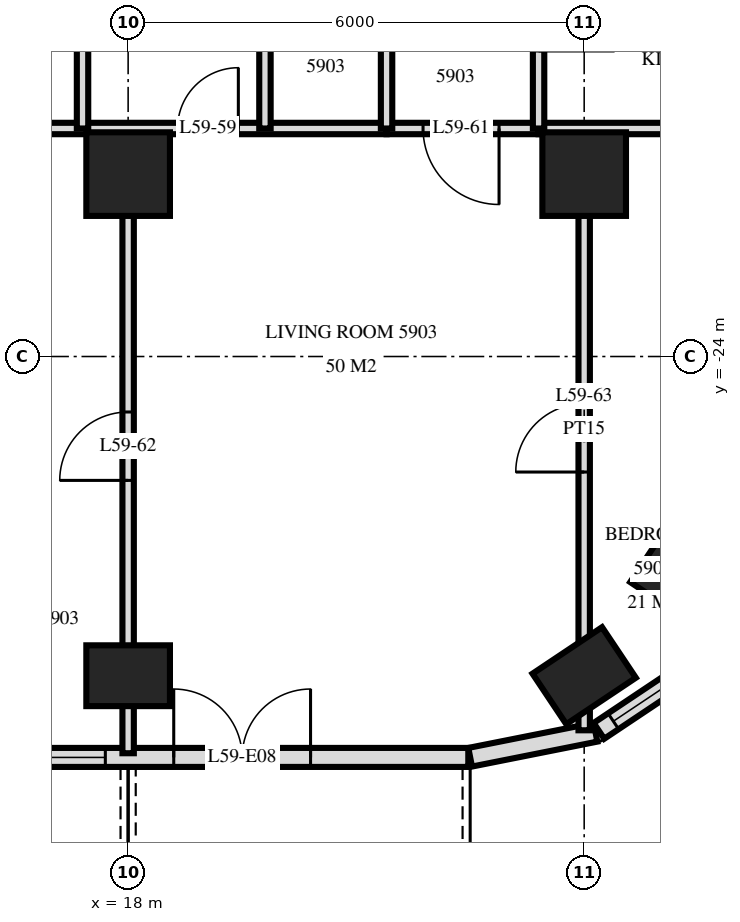
"""IFC4 building model, lengths in metres.
Left out: names, types, materials, properties, quantities, classifications, styles, units other than length and angle.
Written with IfcOpenShell. Run it as: python <this file> out.ifc"""

import sys

from ifc_helpers import new_model, si_unit, direction, frame, frame_2d, origin, origin_2d, place, context, subcontext, project, spatial, rectangle, extrude, element, fill, save


model = new_model("IFC4")
c1 = context("Model", 3, precision=1e-05, world=origin(), true_north=direction((0.0, 1.0)))
c2 = subcontext(c1, "Body", "Model", "MODEL_VIEW")
j1 = project(units=[si_unit("LENGTHUNIT", "METRE"), si_unit("PLANEANGLEUNIT", "RADIAN")], contexts=[c1])
p1 = place(None, origin())
s1 = spatial("IfcSite", under=j1, at=p1, CompositionType="ELEMENT")
p2 = place(p1, origin())
s2 = spatial("IfcBuilding", under=s1, at=p2, CompositionType="ELEMENT")
p3 = place(p2, frame((0.0, 0.0, 225.6)))
s3 = spatial("IfcBuildingStorey", under=s2, at=p3, CompositionType="ELEMENT", Elevation=225.6)
p4 = place(p3, frame((18.0, -28.2, 0.0), z_axis=(0.0, 0.0, 1.0), x_axis=(1.0, 0.0, 0.0)))
e1 = element("IfcColumn", 1, at=p4, inside=s3, PredefinedType="COLUMN", context=c2, shape_type="SweptSolid", body=[
    extrude(rectangle(XDim=1.1, YDim=0.8, at=origin_2d()), origin(), (0.0, 0.0, 1.0), 3.5),
])
p5 = place(p3, frame((18.0, -21.6, 0.0), z_axis=(0.0, 0.0, 1.0), x_axis=(1.0, 0.0, 0.0)))
e2 = element("IfcColumn", 2, at=p5, inside=s3, PredefinedType="COLUMN", context=c2, shape_type="SweptSolid", body=[
    extrude(rectangle(XDim=1.1, YDim=1.1, at=origin_2d()), origin(), (0.0, 0.0, 1.0), 3.5),
])
p6 = place(p3, frame((24.0, -28.2, 0.0), z_axis=(0.0, 0.0, 1.0), x_axis=(0.831459915646, 0.555584744817, 0.0)))
e3 = element("IfcColumn", 3, at=p6, inside=s3, PredefinedType="COLUMN", context=c2, shape_type="SweptSolid", body=[
    extrude(rectangle(XDim=1.1, YDim=0.8, at=origin_2d()), origin(), (0.0, 0.0, 1.0), 3.5),
])
p7 = place(p3, frame((24.0, -21.6, 0.0), z_axis=(0.0, 0.0, 1.0), x_axis=(1.0, 0.0, 0.0)))
e4 = element("IfcColumn", 4, at=p7, inside=s3, PredefinedType="COLUMN", context=c2, shape_type="SweptSolid", body=[
    extrude(rectangle(XDim=1.1, YDim=1.1, at=origin_2d()), origin(), (0.0, 0.0, 1.0), 3.5),
])
p8 = place(p3, frame((25.244, -26.733, 0.0), z_axis=(0.0, 0.0, 1.0), x_axis=(0.555584744817, 0.831459915646, 0.0)))
e5 = element("IfcColumn", 5, at=p8, inside=s3, PredefinedType="COLUMN", context=c2, shape_type="SweptSolid", body=[
    extrude(rectangle(XDim=1.1, YDim=0.8, at=origin_2d()), origin(), (0.0, 0.0, 1.0), 3.5),
])
p9 = place(p3, frame((-22.475, -29.275, 0.0), z_axis=(0.0, 0.0, 1.0), x_axis=(1.0, 0.0, 0.0)))
e6 = element("IfcWall", 6, at=p9, inside=s3, PredefinedType="SOLIDWALL", context=c2, shape_type="SweptSolid", body=[
    extrude(rectangle(XDim=44.951, YDim=0.25, at=frame_2d((22.475, 0.0))), origin(), (0.0, 0.0, 1.0), 3.22),
])
p10 = place(p9, frame((0.575, 0.0, 0.0)))
e7 = element("IfcOpeningElement", 7, at=p10, cuts=e6, PredefinedType="OPENING", context=c2, shape_type="SweptSolid", body=[
    extrude(rectangle(XDim=1.8, YDim=2.4, at=frame_2d((0.9, 1.2))), frame((0.0, 0.135, 0.0), z_axis=(0.0, -1.0, 0.0), x_axis=(1.0, 0.0, 0.0)), (0.0, 0.0, 1.0), 0.27),
])
p11 = place(p9, frame((8.075, 0.0, 0.0)))
e8 = element("IfcOpeningElement", 8, at=p11, cuts=e6, PredefinedType="OPENING", context=c2, shape_type="SweptSolid", body=[
    extrude(rectangle(XDim=1.8, YDim=2.4, at=frame_2d((0.9, 1.2))), frame((0.0, 0.135, 0.0), z_axis=(0.0, -1.0, 0.0), x_axis=(1.0, 0.0, 0.0)), (0.0, 0.0, 1.0), 0.27),
])
p12 = place(p9, frame((11.075, 0.0, 0.0)))
e9 = element("IfcOpeningElement", 9, at=p12, cuts=e6, PredefinedType="OPENING", context=c2, shape_type="SweptSolid", body=[
    extrude(rectangle(XDim=1.8, YDim=2.4, at=frame_2d((0.9, 1.2))), frame((0.0, 0.135, 0.0), z_axis=(0.0, -1.0, 0.0), x_axis=(1.0, 0.0, 0.0)), (0.0, 0.0, 1.0), 0.27),
])
p13 = place(p9, frame((13.775, 0.0, 0.9)))
e10 = element("IfcOpeningElement", 10, at=p13, cuts=e6, PredefinedType="OPENING", context=c2, shape_type="SweptSolid", body=[
    extrude(rectangle(XDim=2.4, YDim=1.5, at=frame_2d((1.2, 0.75))), frame((0.0, 0.135, 0.0), z_axis=(0.0, -1.0, 0.0), x_axis=(1.0, 0.0, 0.0)), (0.0, 0.0, 1.0), 0.27),
])
p14 = place(p9, frame((16.775, 0.0, 0.9)))
e11 = element("IfcOpeningElement", 11, at=p14, cuts=e6, PredefinedType="OPENING", context=c2, shape_type="SweptSolid", body=[
    extrude(rectangle(XDim=2.4, YDim=1.5, at=frame_2d((1.2, 0.75))), frame((0.0, 0.135, 0.0), z_axis=(0.0, -1.0, 0.0), x_axis=(1.0, 0.0, 0.0)), (0.0, 0.0, 1.0), 0.27),
])
p15 = place(p9, frame((20.075, 0.0, 0.0)))
e12 = element("IfcOpeningElement", 12, at=p15, cuts=e6, PredefinedType="OPENING", context=c2, shape_type="SweptSolid", body=[
    extrude(rectangle(XDim=1.8, YDim=2.4, at=frame_2d((0.9, 1.2))), frame((0.0, 0.135, 0.0), z_axis=(0.0, -1.0, 0.0), x_axis=(1.0, 0.0, 0.0)), (0.0, 0.0, 1.0), 0.27),
])
p16 = place(p9, frame((23.075, 0.0, 0.0)))
e13 = element("IfcOpeningElement", 13, at=p16, cuts=e6, PredefinedType="OPENING", context=c2, shape_type="SweptSolid", body=[
    extrude(rectangle(XDim=1.8, YDim=2.4, at=frame_2d((0.9, 1.2))), frame((0.0, 0.135, 0.0), z_axis=(0.0, -1.0, 0.0), x_axis=(1.0, 0.0, 0.0)), (0.0, 0.0, 1.0), 0.27),
])
p17 = place(p9, frame((25.775, 0.0, 0.9)))
e14 = element("IfcOpeningElement", 14, at=p17, cuts=e6, PredefinedType="OPENING", context=c2, shape_type="SweptSolid", body=[
    extrude(rectangle(XDim=2.4, YDim=1.5, at=frame_2d((1.2, 0.75))), frame((0.0, 0.135, 0.0), z_axis=(0.0, -1.0, 0.0), x_axis=(1.0, 0.0, 0.0)), (0.0, 0.0, 1.0), 0.27),
])
p18 = place(p9, frame((29.075, 0.0, 0.0)))
e15 = element("IfcOpeningElement", 15, at=p18, cuts=e6, PredefinedType="OPENING", context=c2, shape_type="SweptSolid", body=[
    extrude(rectangle(XDim=1.8, YDim=2.4, at=frame_2d((0.9, 1.2))), frame((0.0, 0.135, 0.0), z_axis=(0.0, -1.0, 0.0), x_axis=(1.0, 0.0, 0.0)), (0.0, 0.0, 1.0), 0.27),
])
p19 = place(p9, frame((31.775, 0.0, 0.9)))
e16 = element("IfcOpeningElement", 16, at=p19, cuts=e6, PredefinedType="OPENING", context=c2, shape_type="SweptSolid", body=[
    extrude(rectangle(XDim=2.4, YDim=1.5, at=frame_2d((1.2, 0.75))), frame((0.0, 0.135, 0.0), z_axis=(0.0, -1.0, 0.0), x_axis=(1.0, 0.0, 0.0)), (0.0, 0.0, 1.0), 0.27),
])
p20 = place(p9, frame((35.075, 0.0, 0.0)))
e17 = element("IfcOpeningElement", 17, at=p20, cuts=e6, PredefinedType="OPENING", context=c2, shape_type="SweptSolid", body=[
    extrude(rectangle(XDim=1.8, YDim=2.4, at=frame_2d((0.9, 1.2))), frame((0.0, 0.135, 0.0), z_axis=(0.0, -1.0, 0.0), x_axis=(1.0, 0.0, 0.0)), (0.0, 0.0, 1.0), 0.27),
])
p21 = place(p9, frame((37.775, 0.0, 0.9)))
e18 = element("IfcOpeningElement", 18, at=p21, cuts=e6, PredefinedType="OPENING", context=c2, shape_type="SweptSolid", body=[
    extrude(rectangle(XDim=2.4, YDim=1.5, at=frame_2d((1.2, 0.75))), frame((0.0, 0.135, 0.0), z_axis=(0.0, -1.0, 0.0), x_axis=(1.0, 0.0, 0.0)), (0.0, 0.0, 1.0), 0.27),
])
p22 = place(p9, frame((41.075, 0.0, 0.0)))
e19 = element("IfcOpeningElement", 19, at=p22, cuts=e6, PredefinedType="OPENING", context=c2, shape_type="SweptSolid", body=[
    extrude(rectangle(XDim=1.8, YDim=2.4, at=frame_2d((0.9, 1.2))), frame((0.0, 0.135, 0.0), z_axis=(0.0, -1.0, 0.0), x_axis=(1.0, 0.0, 0.0)), (0.0, 0.0, 1.0), 0.27),
])
p23 = place(p3, frame((22.5, -29.273, 0.0), z_axis=(0.0, 0.0, 1.0), x_axis=(0.980775640221, 0.19513878023, 0.0)))
e20 = element("IfcWall", 20, at=p23, inside=s3, PredefinedType="SOLIDWALL", context=c2, shape_type="SweptSolid", body=[
    extrude(rectangle(XDim=1.681, YDim=0.25, at=frame_2d((0.841, 0.0))), origin(), (0.0, 0.0, 1.0), 3.22),
])
p24 = place(p3, frame((24.194, -28.926, 0.0), z_axis=(0.0, 0.0, 1.0), x_axis=(0.831482937015, 0.55555029066, 0.0)))
e21 = element("IfcWall", 21, at=p24, inside=s3, PredefinedType="SOLIDWALL", context=c2, shape_type="SweptSolid", body=[
    extrude(rectangle(XDim=1.656, YDim=0.25, at=frame_2d((0.828, 0.0))), origin(), (0.0, 0.0, 1.0), 3.22),
])
p25 = place(p24, frame((0.228, 0.0, 0.9)))
e22 = element("IfcOpeningElement", 22, at=p25, cuts=e21, PredefinedType="OPENING", context=c2, shape_type="SweptSolid", body=[
    extrude(rectangle(XDim=1.2, YDim=1.5, at=frame_2d((0.6, 0.75))), frame((0.0, 0.135, 0.0), z_axis=(0.0, -1.0, 0.0), x_axis=(1.0, 0.0, 0.0)), (0.0, 0.0, 1.0), 0.27),
])
p26 = place(p3, frame((24.0, -28.918, 0.0), z_axis=(0.0, 0.0, 1.0), x_axis=(0.0, 1.0, 0.0)))
e23 = element("IfcWall", 23, at=p26, inside=s3, PredefinedType="PARTITIONING", context=c2, shape_type="SweptSolid", body=[
    extrude(rectangle(XDim=7.918, YDim=0.15, at=frame_2d((3.959, 0.0))), origin(), (0.0, 0.0, 1.0), 3.22),
])
p27 = place(p26, frame((3.398, 0.0, 0.0)))
e24 = element("IfcOpeningElement", 24, at=p27, cuts=e23, PredefinedType="OPENING", context=c2, shape_type="SweptSolid", body=[
    extrude(rectangle(XDim=0.9, YDim=2.1, at=frame_2d((0.45, 1.05))), frame((0.0, 0.085, 0.0), z_axis=(0.0, -1.0, 0.0), x_axis=(1.0, 0.0, 0.0)), (0.0, 0.0, 1.0), 0.17),
])
p28 = place(p3, frame((23.4, -21.0, 0.0), z_axis=(0.0, 0.0, 1.0), x_axis=(0.0, 1.0, 0.0)))
e25 = element("IfcWall", 25, at=p28, inside=s3, PredefinedType="PARTITIONING", context=c2, shape_type="SweptSolid", body=[
    extrude(rectangle(XDim=3.0, YDim=0.15, at=frame_2d((1.5, 0.0))), origin(), (0.0, 0.0, 1.0), 3.22),
])
p29 = place(p28, frame((1.02, 0.0, 0.0)))
e26 = element("IfcOpeningElement", 26, at=p29, cuts=e25, PredefinedType="OPENING", context=c2, shape_type="SweptSolid", body=[
    extrude(rectangle(XDim=1.0, YDim=2.1, at=frame_2d((0.5, 1.05))), frame((0.0, 0.085, 0.0), z_axis=(0.0, -1.0, 0.0), x_axis=(1.0, 0.0, 0.0)), (0.0, 0.0, 1.0), 0.17),
])
for number, where, z_axis, x_axis in (
    (27, (21.4, -21.0, 0.0), (0.0, 0.0, 1.0), (0.0, 1.0, 0.0)),
    (28, (19.8, -21.0, 0.0), (0.0, 0.0, 1.0), (0.0, 1.0, 0.0)),
):
    element("IfcWall", number, at=place(p3, frame(where, z_axis=z_axis, x_axis=x_axis)), inside=s3, PredefinedType="PARTITIONING", context=c2, shape_type="SweptSolid", body=[
        extrude(rectangle(XDim=3.0, YDim=0.15, at=frame_2d((1.5, 0.0))), origin(), (0.0, 0.0, 1.0), 3.22),
    ])
p30 = place(p3, frame((18.0, -29.22, 0.0), z_axis=(0.0, 0.0, 1.0), x_axis=(0.0, 1.0, 0.0)))
e29 = element("IfcWall", 29, at=p30, inside=s3, PredefinedType="PARTITIONING", context=c2, shape_type="SweptSolid", body=[
    extrude(rectangle(XDim=8.22, YDim=0.15, at=frame_2d((4.11, 0.0))), origin(), (0.0, 0.0, 1.0), 3.22),
])
p31 = place(p30, frame((3.59, 0.0, 0.0)))
e30 = element("IfcOpeningElement", 30, at=p31, cuts=e29, PredefinedType="OPENING", context=c2, shape_type="SweptSolid", body=[
    extrude(rectangle(XDim=0.9, YDim=2.1, at=frame_2d((0.45, 1.05))), frame((0.0, 0.085, 0.0), z_axis=(0.0, -1.0, 0.0), x_axis=(1.0, 0.0, 0.0)), (0.0, 0.0, 1.0), 0.17),
])
p32 = place(p3, frame((17.4, -21.0, 0.0), z_axis=(0.0, 0.0, 1.0), x_axis=(0.0, 1.0, 0.0)))
e31 = element("IfcWall", 31, at=p32, inside=s3, PredefinedType="PARTITIONING", context=c2, shape_type="SweptSolid", body=[
    extrude(rectangle(XDim=3.0, YDim=0.15, at=frame_2d((1.5, 0.0))), origin(), (0.0, 0.0, 1.0), 3.22),
])
p33 = place(p3, frame((21.4, -21.0, 0.0), z_axis=(0.0, 0.0, 1.0), x_axis=(1.0, 0.0, 0.0)))
e32 = element("IfcWall", 32, at=p33, inside=s3, PredefinedType="PARTITIONING", context=c2, shape_type="SweptSolid", body=[
    extrude(rectangle(XDim=2.0, YDim=0.15, at=frame_2d((1.0, 0.0))), origin(), (0.0, 0.0, 1.0), 3.22),
])
p34 = place(p33, frame((0.48, 0.0, 0.0)))
e33 = element("IfcOpeningElement", 33, at=p34, cuts=e32, PredefinedType="OPENING", context=c2, shape_type="SweptSolid", body=[
    extrude(rectangle(XDim=1.0, YDim=2.1, at=frame_2d((0.5, 1.05))), frame((0.0, 0.085, 0.0), z_axis=(0.0, -1.0, 0.0), x_axis=(1.0, 0.0, 0.0)), (0.0, 0.0, 1.0), 0.17),
])
p35 = place(p3, frame((13.3, -21.0, 0.0), z_axis=(0.0, 0.0, 1.0), x_axis=(1.0, 0.0, 0.0)))
e34 = element("IfcWall", 34, at=p35, inside=s3, PredefinedType="PARTITIONING", context=c2, shape_type="SweptSolid", body=[
    extrude(rectangle(XDim=8.1, YDim=0.15, at=frame_2d((4.05, 0.0))), origin(), (0.0, 0.0, 1.0), 3.22),
])
p36 = place(p35, frame((2.48, 0.0, 0.0)))
e35 = element("IfcOpeningElement", 35, at=p36, cuts=e34, PredefinedType="OPENING", context=c2, shape_type="SweptSolid", body=[
    extrude(rectangle(XDim=0.8, YDim=2.1, at=frame_2d((0.4, 1.05))), frame((0.0, 0.085, 0.0), z_axis=(0.0, -1.0, 0.0), x_axis=(1.0, 0.0, 0.0)), (0.0, 0.0, 1.0), 0.17),
])
p37 = place(p35, frame((5.35, 0.0, 0.0)))
e36 = element("IfcOpeningElement", 36, at=p37, cuts=e34, PredefinedType="OPENING", context=c2, shape_type="SweptSolid", body=[
    extrude(rectangle(XDim=0.8, YDim=2.1, at=frame_2d((0.4, 1.05))), frame((0.0, 0.085, 0.0), z_axis=(0.0, -1.0, 0.0), x_axis=(1.0, 0.0, 0.0)), (0.0, 0.0, 1.0), 0.17),
])
p38 = place(p3, frame((23.4, -21.0, 0.0), z_axis=(0.0, 0.0, 1.0), x_axis=(1.0, 0.0, 0.0)))
e37 = element("IfcWall", 37, at=p38, inside=s3, PredefinedType="PARTITIONING", context=c2, shape_type="SweptSolid", body=[
    extrude(rectangle(XDim=3.42, YDim=0.15, at=frame_2d((1.71, 0.0))), origin(), (0.0, 0.0, 1.0), 3.22),
])
p39 = place(p25, origin())
e38 = element("IfcWindow", 38, at=p39, inside=s3, PartitioningType="SINGLE_PANEL", PredefinedType="WINDOW", context=c2, shape_type="SweptSolid", body=[
    extrude(rectangle(XDim=1.2, YDim=1.5, at=frame_2d((0.6, 0.75))), frame((0.0, 0.03, 0.0), z_axis=(0.0, -1.0, 0.0), x_axis=(1.0, 0.0, 0.0)), (0.0, 0.0, 1.0), 0.06),
])
fill(e22, e38)
p40 = place(p21, origin())
e39 = element("IfcWindow", 39, at=p40, inside=s3, PartitioningType="SINGLE_PANEL", PredefinedType="WINDOW", context=c2, shape_type="SweptSolid", body=[
    extrude(rectangle(XDim=2.4, YDim=1.5, at=frame_2d((1.2, 0.75))), frame((0.0, 0.03, 0.0), z_axis=(0.0, -1.0, 0.0), x_axis=(1.0, 0.0, 0.0)), (0.0, 0.0, 1.0), 0.06),
])
fill(e18, e39)
p41 = place(p22, origin())
e40 = element("IfcDoor", 40, at=p41, inside=s3, OperationType="DOUBLE_DOOR_SINGLE_SWING", PredefinedType="DOOR", context=c2, shape_type="SweptSolid", body=[
    extrude(rectangle(XDim=1.8, YDim=2.4, at=frame_2d((0.9, 1.2))), frame((0.0, 0.025, 0.0), z_axis=(0.0, -1.0, 0.0), x_axis=(1.0, 0.0, 0.0)), (0.0, 0.0, 1.0), 0.05),
])
fill(e19, e40)
p42 = place(p37, origin())
e41 = element("IfcDoor", 41, at=p42, inside=s3, OperationType="SINGLE_SWING_LEFT", PredefinedType="DOOR", context=c2, shape_type="SweptSolid", body=[
    extrude(rectangle(XDim=0.8, YDim=2.1, at=frame_2d((0.4, 1.05))), frame((0.0, 0.025, 0.0), z_axis=(0.0, -1.0, 0.0), x_axis=(1.0, 0.0, 0.0)), (0.0, 0.0, 1.0), 0.05),
])
fill(e36, e41)
p43 = place(p34, frame((0.5, 0.0, 0.0), z_axis=(0.0, 0.0, 1.0), x_axis=(-1.0, 0.0, 0.0)))
e42 = element("IfcDoor", 42, at=p43, inside=s3, OperationType="SINGLE_SWING_RIGHT", PredefinedType="DOOR", context=c2, shape_type="SweptSolid", body=[
    extrude(rectangle(XDim=1.0, YDim=2.1, at=frame_2d((0.0, 1.05))), frame((0.0, -0.025, 0.0), z_axis=(0.0, 1.0, 0.0), x_axis=(-1.0, 0.0, 0.0)), (0.0, 0.0, 1.0), 0.05),
])
fill(e33, e42)
p44 = place(p31, origin())
e43 = element("IfcDoor", 43, at=p44, inside=s3, OperationType="SINGLE_SWING_RIGHT", PredefinedType="DOOR", context=c2, shape_type="SweptSolid", body=[
    extrude(rectangle(XDim=0.9, YDim=2.1, at=frame_2d((0.45, 1.05))), frame((0.0, 0.025, 0.0), z_axis=(0.0, -1.0, 0.0), x_axis=(1.0, 0.0, 0.0)), (0.0, 0.0, 1.0), 0.05),
])
fill(e30, e43)
p45 = place(p27, origin())
e44 = element("IfcDoor", 44, at=p45, inside=s3, OperationType="SINGLE_SWING_RIGHT", PredefinedType="DOOR", context=c2, shape_type="SweptSolid", body=[
    extrude(rectangle(XDim=0.9, YDim=2.1, at=frame_2d((0.45, 1.05))), frame((0.0, 0.025, 0.0), z_axis=(0.0, -1.0, 0.0), x_axis=(1.0, 0.0, 0.0)), (0.0, 0.0, 1.0), 0.05),
])
fill(e24, e44)
save(model, sys.argv[1])
